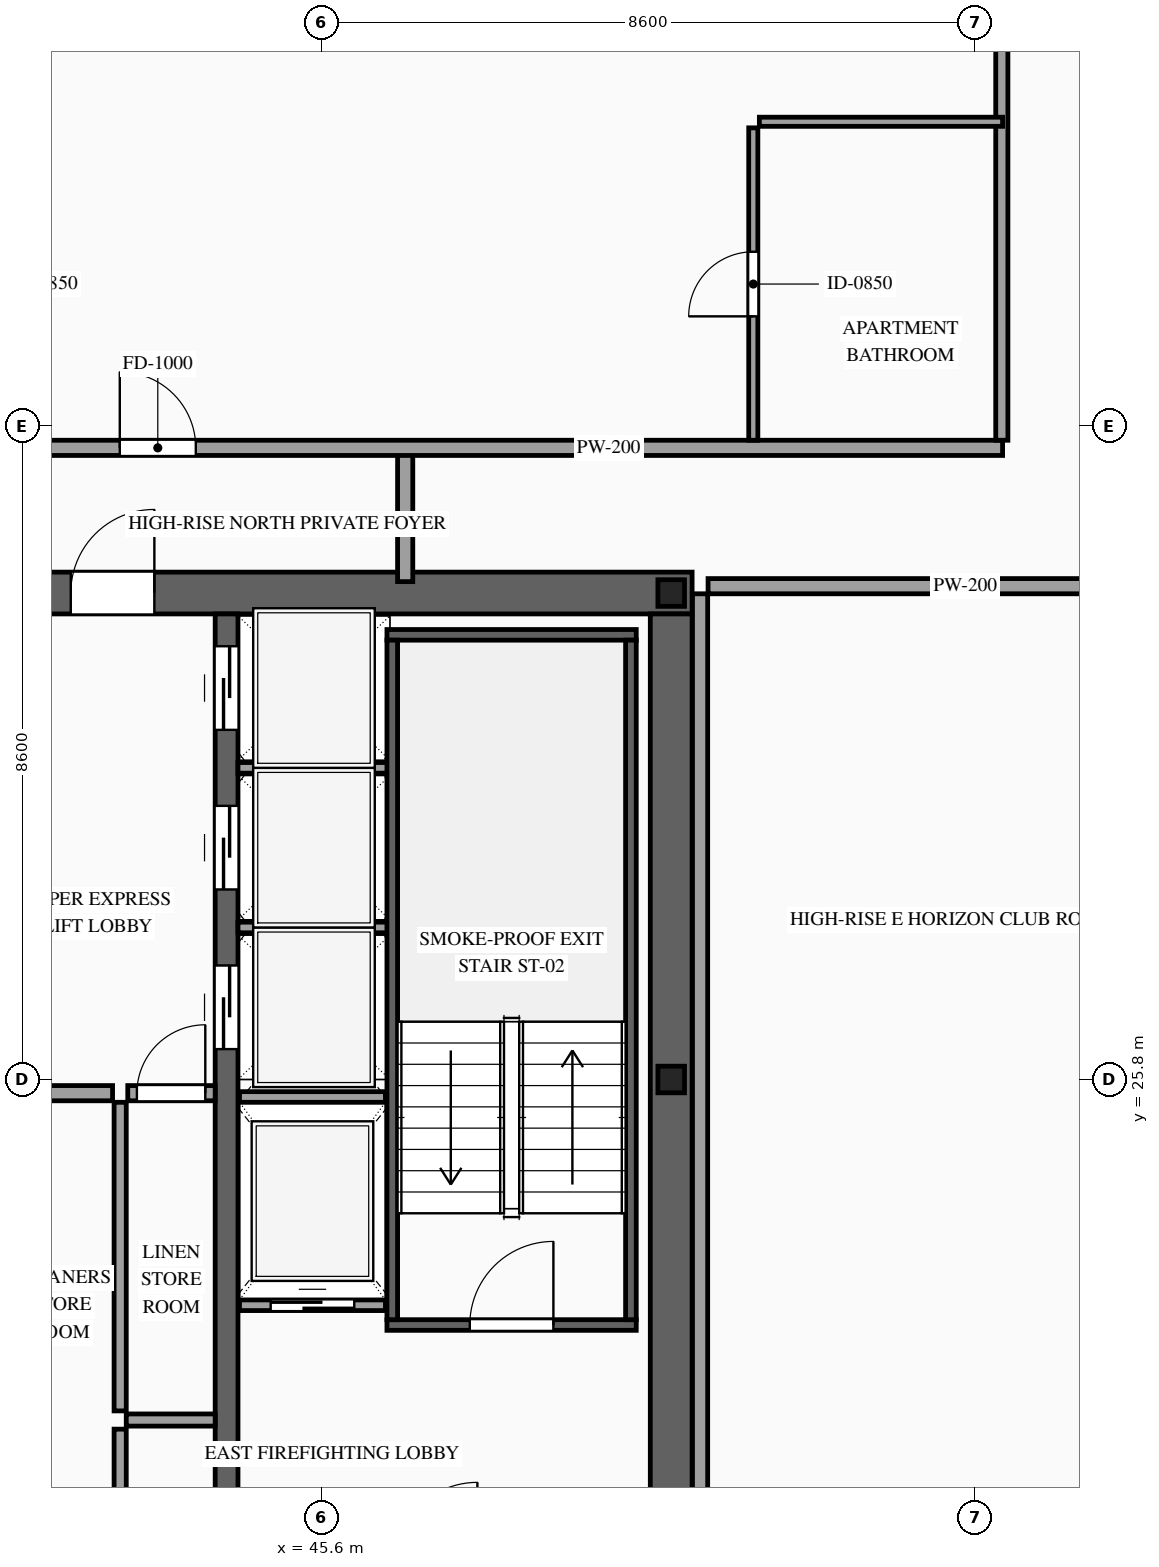
"""IFC4 building model, lengths in metres.
Left out: names, types, materials, properties, quantities, classifications, styles, units other than length and angle.
Written with IfcOpenShell. Run it as: python <this file> out.ifc"""

import sys

from ifc_helpers import new_model, si_unit, direction, frame, frame_2d, origin, origin_2d, place, context, subcontext, project, spatial, rectangle, i_section, extrude, source, transform, mapped, element, fill, save


model = new_model("IFC4")
c1 = context("Model", 3, precision=1e-05, world=origin(), true_north=direction((0.0, 1.0)))
c2 = subcontext(c1, "Body", "Model", "MODEL_VIEW")
j1 = project(units=[si_unit("LENGTHUNIT", "METRE"), si_unit("PLANEANGLEUNIT", "RADIAN")], contexts=[c1])
p1 = place(None, origin())
s1 = spatial("IfcSite", under=j1, at=p1, CompositionType="ELEMENT")
p2 = place(p1, origin())
s2 = spatial("IfcBuilding", under=s1, at=p2, CompositionType="ELEMENT")
p3 = place(p2, frame((0.0, 0.0, 275.1)))
s3 = spatial("IfcBuildingStorey", under=s2, at=p3, CompositionType="ELEMENT", Elevation=275.1)
p4 = place(p3, frame((23.525, 32.2, 0.0), z_axis=(0.0, 0.0, 1.0), x_axis=(1.0, 0.0, 0.0)))
e1 = element("IfcWall", 1, at=p4, inside=s3, PredefinedType="SHEAR", context=c2, shape_type="SweptSolid", body=[
    extrude(rectangle(XDim=26.95, YDim=0.55, at=frame_2d((13.475, 0.0))), origin(), (0.0, 0.0, 1.0), 3.5),
])
p5 = place(p4, frame((4.545, 0.0, 0.0)))
e2 = element("IfcOpeningElement", 2, at=p5, cuts=e1, PredefinedType="OPENING", context=c2, shape_type="SweptSolid", body=[
    extrude(rectangle(XDim=0.9, YDim=2.15, at=frame_2d((0.45, 1.075))), frame((0.0, 0.29, 0.0), z_axis=(0.0, -1.0, 0.0), x_axis=(1.0, 0.0, 0.0)), (0.0, 0.0, 1.0), 0.58),
])
p6 = place(p4, frame((9.825, 0.0, 0.0)))
e3 = element("IfcOpeningElement", 3, at=p6, cuts=e1, PredefinedType="OPENING", context=c2, shape_type="SweptSolid", body=[
    extrude(rectangle(XDim=1.1, YDim=2.2, at=frame_2d((0.55, 1.1))), frame((0.0, 0.29, 0.0), z_axis=(0.0, -1.0, 0.0), x_axis=(1.0, 0.0, 0.0)), (0.0, 0.0, 1.0), 0.58),
])
p7 = place(p4, frame((15.675, 0.0, 0.0)))
e4 = element("IfcOpeningElement", 4, at=p7, cuts=e1, PredefinedType="OPENING", context=c2, shape_type="SweptSolid", body=[
    extrude(rectangle(XDim=1.1, YDim=2.2, at=frame_2d((0.55, 1.1))), frame((0.0, 0.29, 0.0), z_axis=(0.0, -1.0, 0.0), x_axis=(1.0, 0.0, 0.0)), (0.0, 0.0, 1.0), 0.58),
])
p8 = place(p4, frame((18.775, 0.0, 0.0)))
e5 = element("IfcOpeningElement", 5, at=p8, cuts=e1, PredefinedType="OPENING", context=c2, shape_type="SweptSolid", body=[
    extrude(rectangle(XDim=1.1, YDim=2.2, at=frame_2d((0.55, 1.1))), frame((0.0, 0.29, 0.0), z_axis=(0.0, -1.0, 0.0), x_axis=(1.0, 0.0, 0.0)), (0.0, 0.0, 1.0), 0.58),
])
m1 = source(origin(), c2, "Body", "SweptSolid", [
    extrude(rectangle(XDim=12.25, YDim=0.55, at=frame_2d((6.125, 0.0))), origin(), (0.0, 0.0, 1.0), 3.5),
])
p9 = place(p3, frame((50.2, 19.675, 0.0), z_axis=(0.0, 0.0, 1.0), x_axis=(0.0, 1.0, 0.0)))
e6 = element("IfcWall", 6, at=p9, inside=s3, PredefinedType="SHEAR", context=c2, shape_type="MappedRepresentation", body=[
    mapped(m1, transform((0.0, 0.0, 0.0), scale=1.0)),
])
p10 = place(p3, frame((44.35, 19.675, 0.0), z_axis=(0.0, 0.0, 1.0), x_axis=(0.0, 1.0, 0.0)))
e7 = element("IfcWall", 7, at=p10, inside=s3, PredefinedType="SOLIDWALL", context=c2, shape_type="SweptSolid", body=[
    extrude(rectangle(XDim=12.25, YDim=0.3, at=frame_2d((6.125, 0.0))), origin(), (0.0, 0.0, 1.0), 3.5),
])
p11 = place(p10, frame((6.525, 0.0, 0.0)))
e8 = element("IfcOpeningElement", 8, at=p11, cuts=e7, PredefinedType="OPENING", context=c2, shape_type="SweptSolid", body=[
    extrude(rectangle(XDim=1.1, YDim=2.2, at=frame_2d((0.55, 1.1))), frame((0.0, 0.165, 0.0), z_axis=(0.0, -1.0, 0.0), x_axis=(1.0, 0.0, 0.0)), (0.0, 0.0, 1.0), 0.33),
])
p12 = place(p10, frame((8.625, 0.0, 0.0)))
e9 = element("IfcOpeningElement", 9, at=p12, cuts=e7, PredefinedType="OPENING", context=c2, shape_type="SweptSolid", body=[
    extrude(rectangle(XDim=1.1, YDim=2.2, at=frame_2d((0.55, 1.1))), frame((0.0, 0.165, 0.0), z_axis=(0.0, -1.0, 0.0), x_axis=(1.0, 0.0, 0.0)), (0.0, 0.0, 1.0), 0.33),
])
p13 = place(p10, frame((10.725, 0.0, 0.0)))
e10 = element("IfcOpeningElement", 10, at=p13, cuts=e7, PredefinedType="OPENING", context=c2, shape_type="SweptSolid", body=[
    extrude(rectangle(XDim=1.1, YDim=2.2, at=frame_2d((0.55, 1.1))), frame((0.0, 0.165, 0.0), z_axis=(0.0, -1.0, 0.0), x_axis=(1.0, 0.0, 0.0)), (0.0, 0.0, 1.0), 0.33),
])
m2 = source(origin(), c2, "Body", "SweptSolid", [
    extrude(i_section(OverallWidth=0.35, OverallDepth=0.35, WebThickness=0.012, FlangeThickness=0.019, at=origin_2d()), origin(), (0.0, 0.0, 1.0), 3.5),
])
for number, where, z_axis, x_axis in (
    (11, (50.2, 25.8, 0.0), (0.0, 0.0, 1.0), (1.0, 0.0, 0.0)),
    (12, (50.2, 32.2, 0.0), (0.0, 0.0, 1.0), (1.0, 0.0, 0.0)),
):
    element("IfcColumn", number, at=place(p3, frame(where, z_axis=z_axis, x_axis=x_axis)), inside=s3, PredefinedType="COLUMN", context=c2, shape_type="MappedRepresentation", body=[
        mapped(m2, transform((0.0, 0.0, 0.0), scale=1.0)),
    ])
p14 = place(p3, frame((44.52, 22.83, 0.0), z_axis=(0.0, 0.0, 1.0), x_axis=(1.0, 0.0, 0.0)))
e13 = element("IfcWall", 13, at=p14, inside=s3, PredefinedType="SOLIDWALL", context=c2, shape_type="SweptSolid", body=[
    extrude(rectangle(XDim=1.92, YDim=0.14, at=frame_2d((0.96, 0.0))), origin(), (0.0, 0.0, 1.0), 3.28),
])
p15 = place(p14, frame((0.41, 0.0, 0.0)))
e14 = element("IfcOpeningElement", 14, at=p15, cuts=e13, PredefinedType="OPENING", context=c2, shape_type="SweptSolid", body=[
    extrude(rectangle(XDim=1.1, YDim=2.2, at=frame_2d((0.55, 1.1))), frame((0.0, 0.085, 0.0), z_axis=(0.0, -1.0, 0.0), x_axis=(1.0, 0.0, 0.0)), (0.0, 0.0, 1.0), 0.17),
])
m3 = source(origin(), c2, "Body", "SweptSolid", [
    extrude(rectangle(XDim=1.92, YDim=0.14, at=frame_2d((0.96, 0.0))), origin(), (0.0, 0.0, 1.0), 3.28),
])
p16 = place(p3, frame((44.52, 25.57, 0.0), z_axis=(0.0, 0.0, 1.0), x_axis=(1.0, 0.0, 0.0)))
e15 = element("IfcWall", 15, at=p16, inside=s3, PredefinedType="SOLIDWALL", context=c2, shape_type="MappedRepresentation", body=[
    mapped(m3, transform((0.0, 0.0, 0.0), scale=1.0)),
])
m4 = source(origin(), c2, "Body", "SweptSolid", [
    extrude(rectangle(XDim=2.0, YDim=0.14, at=frame_2d((1.0, 0.0))), origin(), (0.0, 0.0, 1.0), 3.28),
])
for number, where, z_axis, x_axis in (
    (16, (44.5, 27.8, 0.0), (0.0, 0.0, 1.0), (1.0, 0.0, 0.0)),
    (17, (44.5, 29.9, 0.0), (0.0, 0.0, 1.0), (1.0, 0.0, 0.0)),
):
    element("IfcWall", number, at=place(p3, frame(where, z_axis=z_axis, x_axis=x_axis)), inside=s3, PredefinedType="SOLIDWALL", context=c2, shape_type="MappedRepresentation", body=[
        mapped(m4, transform((0.0, 0.0, 0.0), scale=1.0)),
    ])
p17 = place(p3, frame((46.46, 22.57, 0.0), z_axis=(0.0, 0.0, 1.0), x_axis=(1.0, 0.0, 0.0)))
e18 = element("IfcWall", 18, at=p17, inside=s3, PredefinedType="SOLIDWALL", context=c2, shape_type="SweptSolid", body=[
    extrude(rectangle(XDim=3.28, YDim=0.14, at=frame_2d((1.64, 0.0))), origin(), (0.0, 0.0, 1.0), 3.28),
])
p18 = place(p17, frame((1.09, 0.0, 0.0)))
e19 = element("IfcOpeningElement", 19, at=p18, cuts=e18, PredefinedType="OPENING", context=c2, shape_type="SweptSolid", body=[
    extrude(rectangle(XDim=1.1, YDim=2.2, at=frame_2d((0.55, 1.1))), frame((0.0, 0.085, 0.0), z_axis=(0.0, -1.0, 0.0), x_axis=(1.0, 0.0, 0.0)), (0.0, 0.0, 1.0), 0.17),
])
m5 = source(origin(), c2, "Body", "SweptSolid", [
    extrude(rectangle(XDim=3.28, YDim=0.14, at=frame_2d((1.64, 0.0))), origin(), (0.0, 0.0, 1.0), 3.28),
])
p19 = place(p3, frame((46.46, 31.65, 0.0), z_axis=(0.0, 0.0, 1.0), x_axis=(1.0, 0.0, 0.0)))
e20 = element("IfcWall", 20, at=p19, inside=s3, PredefinedType="SOLIDWALL", context=c2, shape_type="MappedRepresentation", body=[
    mapped(m5, transform((0.0, 0.0, 0.0), scale=1.0)),
])
m6 = source(origin(), c2, "Body", "SweptSolid", [
    extrude(rectangle(XDim=8.94, YDim=0.14, at=frame_2d((4.47, 0.0))), origin(), (0.0, 0.0, 1.0), 3.28),
])
for number, where, z_axis, x_axis in (
    (21, (46.53, 22.64, 0.0), (0.0, 0.0, 1.0), (0.0, 1.0, 0.0)),
    (22, (49.67, 22.64, 0.0), (0.0, 0.0, 1.0), (0.0, 1.0, 0.0)),
):
    element("IfcWall", number, at=place(p3, frame(where, z_axis=z_axis, x_axis=x_axis)), inside=s3, PredefinedType="SOLIDWALL", context=c2, shape_type="MappedRepresentation", body=[
        mapped(m6, transform((0.0, 0.0, 0.0), scale=1.0)),
    ])
m7 = source(origin(), c2, "Body", "SweptSolid", [
    extrude(rectangle(XDim=1.34, YDim=0.16, at=frame_2d((0.67, 0.0))), origin(), (0.0, 0.0, 1.0), 3.28),
])
p20 = place(p3, frame((42.95, 19.86, 0.0), z_axis=(0.0, 0.0, 1.0), x_axis=(0.0, 1.0, 0.0)))
e23 = element("IfcWall", 23, at=p20, inside=s3, PredefinedType="PARTITIONING", context=c2, shape_type="MappedRepresentation", body=[
    mapped(m7, transform((0.0, 0.0, 0.0), scale=1.0)),
])
m8 = source(origin(), c2, "Body", "SweptSolid", [
    extrude(rectangle(XDim=1.17, YDim=0.16, at=frame_2d((0.585, 0.0))), origin(), (0.0, 0.0, 1.0), 3.28),
])
p21 = place(p3, frame((43.03, 21.32, 0.0), z_axis=(0.0, 0.0, 1.0), x_axis=(1.0, 0.0, 0.0)))
e24 = element("IfcWall", 24, at=p21, inside=s3, PredefinedType="PARTITIONING", context=c2, shape_type="MappedRepresentation", body=[
    mapped(m8, transform((0.0, 0.0, 0.0), scale=1.0)),
])
m9 = source(origin(), c2, "Body", "SweptSolid", [
    extrude(rectangle(XDim=1.35, YDim=0.2, at=frame_2d((0.675, 0.0))), origin(), (0.0, 0.0, 1.0), 3.28),
])
p22 = place(p3, frame((41.5, 25.62, 0.0), z_axis=(0.0, 0.0, 1.0), x_axis=(1.0, 0.0, 0.0)))
e25 = element("IfcWall", 25, at=p22, inside=s3, PredefinedType="PARTITIONING", context=c2, shape_type="MappedRepresentation", body=[
    mapped(m9, transform((0.0, 0.0, 0.0), scale=1.0)),
])
m10 = source(origin(), c2, "Body", "SweptSolid", [
    extrude(rectangle(XDim=4.06, YDim=0.16, at=frame_2d((2.03, 0.0))), origin(), (0.0, 0.0, 1.0), 3.28),
])
p23 = place(p3, frame((42.95, 21.44, 0.0), z_axis=(0.0, 0.0, 1.0), x_axis=(0.0, 1.0, 0.0)))
e26 = element("IfcWall", 26, at=p23, inside=s3, PredefinedType="PARTITIONING", context=c2, shape_type="MappedRepresentation", body=[
    mapped(m10, transform((0.0, 0.0, 0.0), scale=1.0)),
])
p24 = place(p3, frame((43.05, 25.62, 0.0), z_axis=(0.0, 0.0, 1.0), x_axis=(1.0, 0.0, 0.0)))
e27 = element("IfcWall", 27, at=p24, inside=s3, PredefinedType="PARTITIONING", context=c2, shape_type="SweptSolid", body=[
    extrude(rectangle(XDim=1.15, YDim=0.2, at=frame_2d((0.575, 0.0))), origin(), (0.0, 0.0, 1.0), 3.28),
])
p25 = place(p24, frame((0.12, 0.0, 0.0)))
e28 = element("IfcOpeningElement", 28, at=p25, cuts=e27, PredefinedType="OPENING", context=c2, shape_type="SweptSolid", body=[
    extrude(rectangle(XDim=0.9, YDim=2.15, at=frame_2d((0.45, 1.075))), frame((0.0, 0.115, 0.0), z_axis=(0.0, -1.0, 0.0), x_axis=(1.0, 0.0, 0.0)), (0.0, 0.0, 1.0), 0.23),
])
m11 = source(origin(), c2, "Body", "SweptSolid", [
    extrude(rectangle(XDim=1.7, YDim=0.2, at=frame_2d((0.85, 0.0))), origin(), (0.0, 0.0, 1.0), 3.28),
])
p26 = place(p3, frame((46.7, 32.35, 0.0), z_axis=(0.0, 0.0, 1.0), x_axis=(0.0, 1.0, 0.0)))
e29 = element("IfcWall", 29, at=p26, inside=s3, PredefinedType="PARTITIONING", context=c2, shape_type="MappedRepresentation", body=[
    mapped(m11, transform((0.0, 0.0, 0.0), scale=1.0)),
])
p27 = place(p3, frame((37.08, 34.11, 0.0), z_axis=(0.0, 0.0, 1.0), x_axis=(1.0, 0.0, 0.0)))
e30 = element("IfcWall", 30, at=p27, inside=s3, PredefinedType="PARTITIONING", context=c2, shape_type="SweptSolid", body=[
    extrude(rectangle(XDim=17.48, YDim=0.2, at=frame_2d((8.74, 0.0))), origin(), (0.0, 0.0, 1.0), 3.28),
])
p28 = place(p27, frame((5.865, 0.0, 0.0)))
e31 = element("IfcOpeningElement", 31, at=p28, cuts=e30, PredefinedType="OPENING", context=c2, shape_type="SweptSolid", body=[
    extrude(rectangle(XDim=1.0, YDim=2.2, at=frame_2d((0.5, 1.1))), frame((0.0, 0.115, 0.0), z_axis=(0.0, -1.0, 0.0), x_axis=(1.0, 0.0, 0.0)), (0.0, 0.0, 1.0), 0.23),
])
m12 = source(origin(), c2, "Body", "SweptSolid", [
    extrude(rectangle(XDim=11.89, YDim=0.16, at=frame_2d((5.945, 0.0))), origin(), (0.0, 0.0, 1.0), 3.28),
])
p29 = place(p3, frame((54.55, 34.21, 0.0), z_axis=(0.0, 0.0, 1.0), x_axis=(0.0, 1.0, 0.0)))
e32 = element("IfcWall", 32, at=p29, inside=s3, PredefinedType="PARTITIONING", context=c2, shape_type="MappedRepresentation", body=[
    mapped(m12, transform((0.0, 0.0, 0.0), scale=1.0)),
])
m13 = source(origin(), c2, "Body", "SweptSolid", [
    extrude(rectangle(XDim=3.2, YDim=0.12, at=frame_2d((1.6, 0.0))), origin(), (0.0, 0.0, 1.0), 3.28),
])
p30 = place(p3, frame((51.36, 38.4, 0.0), z_axis=(0.0, 0.0, 1.0), x_axis=(1.0, 0.0, 0.0)))
e33 = element("IfcWall", 33, at=p30, inside=s3, PredefinedType="PARTITIONING", context=c2, shape_type="MappedRepresentation", body=[
    mapped(m13, transform((0.0, 0.0, 0.0), scale=1.0)),
])
p31 = place(p3, frame((51.28, 34.21, 0.0), z_axis=(0.0, 0.0, 1.0), x_axis=(0.0, 1.0, 0.0)))
e34 = element("IfcWall", 34, at=p31, inside=s3, PredefinedType="PARTITIONING", context=c2, shape_type="SweptSolid", body=[
    extrude(rectangle(XDim=4.11, YDim=0.12, at=frame_2d((2.055, 0.0))), origin(), (0.0, 0.0, 1.0), 3.28),
])
p32 = place(p31, frame((1.63, 0.0, 0.0)))
e35 = element("IfcOpeningElement", 35, at=p32, cuts=e34, PredefinedType="OPENING", context=c2, shape_type="SweptSolid", body=[
    extrude(rectangle(XDim=0.85, YDim=2.1, at=frame_2d((0.425, 1.05))), frame((0.0, 0.075, 0.0), z_axis=(0.0, -1.0, 0.0), x_axis=(1.0, 0.0, 0.0)), (0.0, 0.0, 1.0), 0.15),
])
m14 = source(origin(), c2, "Body", "SweptSolid", [
    extrude(rectangle(XDim=6.765, YDim=0.2, at=frame_2d((3.382, 0.0))), origin(), (0.0, 0.0, 1.0), 2.825),
])
p33 = place(p3, frame((50.685, 32.29, 0.0), z_axis=(0.0, 0.0, 1.0), x_axis=(1.0, 0.0, 0.0)))
e36 = element("IfcWall", 36, at=p33, inside=s3, PredefinedType="PARTITIONING", context=c2, shape_type="MappedRepresentation", body=[
    mapped(m14, transform((0.0, 0.0, 0.0), scale=1.0)),
])
m15 = source(origin(), c2, "Body", "SweptSolid", [
    extrude(rectangle(XDim=12.78, YDim=0.2, at=frame_2d((6.39, 0.0))), origin(), (0.0, 0.0, 1.0), 3.28),
])
p34 = place(p3, frame((50.58, 19.41, 0.0), z_axis=(0.0, 0.0, 1.0), x_axis=(0.0, 1.0, 0.0)))
e37 = element("IfcWall", 37, at=p34, inside=s3, PredefinedType="PARTITIONING", context=c2, shape_type="MappedRepresentation", body=[
    mapped(m15, transform((0.0, 0.0, 0.0), scale=1.0)),
])
m16 = source(origin(), c2, "Body", "SweptSolid", [
    extrude(rectangle(XDim=1.1, YDim=2.2, at=frame_2d((0.55, 1.1))), frame((0.0, 0.025, 0.0), z_axis=(0.0, -1.0, 0.0), x_axis=(1.0, 0.0, 0.0)), (0.0, 0.0, 1.0), 0.05),
])
p35 = place(p15, origin())
e38 = element("IfcDoor", 38, at=p35, inside=s3, OperationType="SLIDING_TO_RIGHT", PredefinedType="DOOR", context=c2, shape_type="MappedRepresentation", body=[
    mapped(m16, transform((0.0, 0.0, 0.0), scale=1.0)),
])
fill(e14, e38)
p36 = place(p11, origin())
e39 = element("IfcDoor", 39, at=p36, inside=s3, OperationType="SLIDING_TO_LEFT", PredefinedType="DOOR", context=c2, shape_type="MappedRepresentation", body=[
    mapped(m16, transform((0.0, 0.0, 0.0), scale=1.0)),
])
fill(e8, e39)
p37 = place(p12, origin())
e40 = element("IfcDoor", 40, at=p37, inside=s3, OperationType="SLIDING_TO_RIGHT", PredefinedType="DOOR", context=c2, shape_type="MappedRepresentation", body=[
    mapped(m16, transform((0.0, 0.0, 0.0), scale=1.0)),
])
fill(e9, e40)
p38 = place(p13, origin())
e41 = element("IfcDoor", 41, at=p38, inside=s3, OperationType="SLIDING_TO_LEFT", PredefinedType="DOOR", context=c2, shape_type="MappedRepresentation", body=[
    mapped(m16, transform((0.0, 0.0, 0.0), scale=1.0)),
])
fill(e10, e41)
m17 = source(origin(), c2, "Body", "SweptSolid", [
    extrude(rectangle(XDim=1.1, YDim=2.2, at=frame_2d((0.55, 1.1))), frame((0.0, 0.025, 0.0), z_axis=(0.0, -1.0, 0.0), x_axis=(1.0, 0.0, 0.0)), (0.0, 0.0, 1.0), 0.05),
])
p39 = place(p18, origin())
e42 = element("IfcDoor", 42, at=p39, inside=s3, OperationType="SINGLE_SWING_RIGHT", PredefinedType="DOOR", context=c2, shape_type="MappedRepresentation", body=[
    mapped(m17, transform((0.0, 0.0, 0.0), scale=1.0)),
])
fill(e19, e42)
p40 = place(p8, origin())
e43 = element("IfcDoor", 43, at=p40, inside=s3, OperationType="SINGLE_SWING_RIGHT", PredefinedType="DOOR", context=c2, shape_type="MappedRepresentation", body=[
    mapped(m17, transform((0.0, 0.0, 0.0), scale=1.0)),
])
fill(e5, e43)
m18 = source(origin(), c2, "Body", "SweptSolid", [
    extrude(rectangle(XDim=0.9, YDim=2.15, at=frame_2d((0.45, 1.075))), frame((0.0, 0.025, 0.0), z_axis=(0.0, -1.0, 0.0), x_axis=(1.0, 0.0, 0.0)), (0.0, 0.0, 1.0), 0.05),
])
p41 = place(p25, origin())
e44 = element("IfcDoor", 44, at=p41, inside=s3, OperationType="SINGLE_SWING_RIGHT", PredefinedType="DOOR", context=c2, shape_type="MappedRepresentation", body=[
    mapped(m18, transform((0.0, 0.0, 0.0), scale=1.0)),
])
fill(e28, e44)
m19 = source(origin(), c2, "Body", "SweptSolid", [
    extrude(rectangle(XDim=1.0, YDim=2.2, at=frame_2d((0.5, 1.1))), frame((0.0, 0.025, 0.0), z_axis=(0.0, -1.0, 0.0), x_axis=(1.0, 0.0, 0.0)), (0.0, 0.0, 1.0), 0.05),
])
p42 = place(p28, origin())
e45 = element("IfcDoor", 45, at=p42, inside=s3, OperationType="SINGLE_SWING_LEFT", PredefinedType="DOOR", context=c2, shape_type="MappedRepresentation", body=[
    mapped(m19, transform((0.0, 0.0, 0.0), scale=1.0)),
])
fill(e31, e45)
m20 = source(origin(), c2, "Body", "SweptSolid", [
    extrude(rectangle(XDim=0.85, YDim=2.1, at=frame_2d((0.425, 1.05))), frame((0.0, 0.025, 0.0), z_axis=(0.0, -1.0, 0.0), x_axis=(1.0, 0.0, 0.0)), (0.0, 0.0, 1.0), 0.05),
])
p43 = place(p32, origin())
e46 = element("IfcDoor", 46, at=p43, inside=s3, OperationType="SINGLE_SWING_LEFT", PredefinedType="DOOR", context=c2, shape_type="MappedRepresentation", body=[
    mapped(m20, transform((0.0, 0.0, 0.0), scale=1.0)),
])
fill(e35, e46)
save(model, sys.argv[1])
